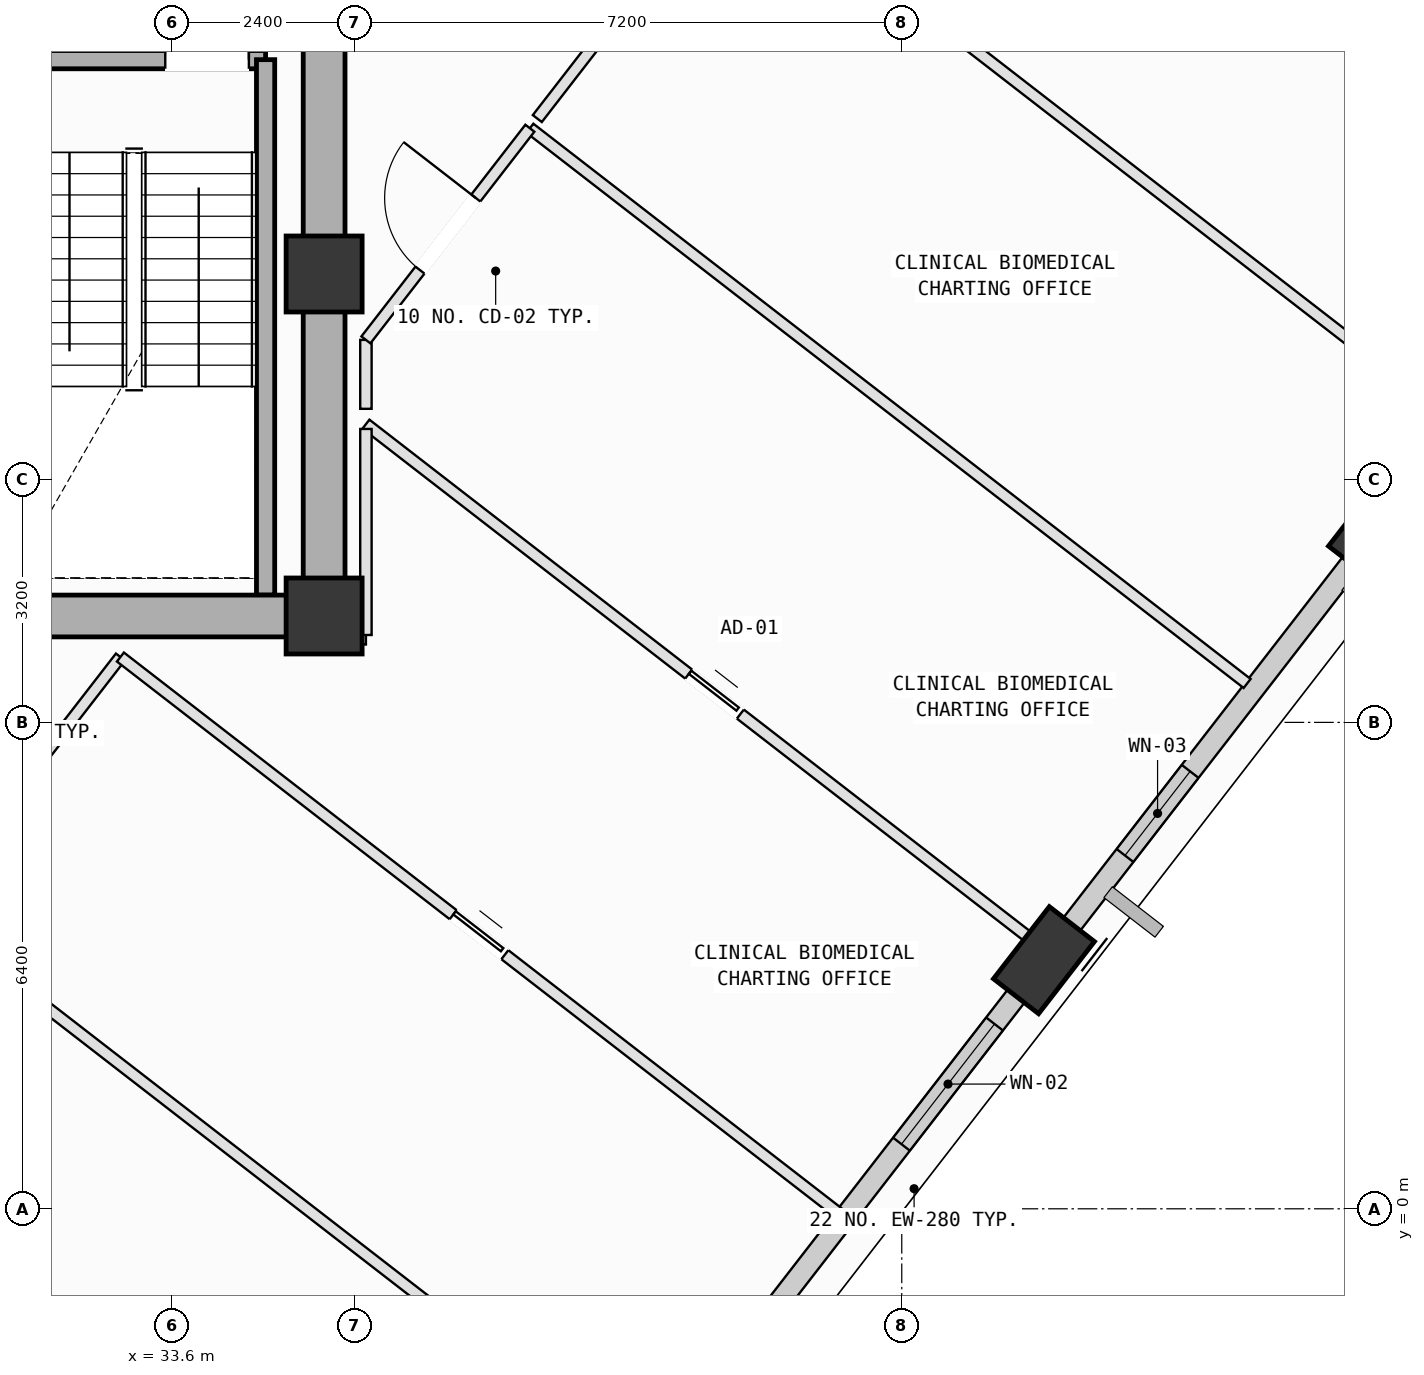
"""IFC4 building model, lengths in metres.
Left out: names, types, materials, properties, quantities, classifications, styles, units other than length and angle.
Written with IfcOpenShell. Run it as: python <this file> out.ifc"""

import sys

from ifc_helpers import new_model, si_unit, direction, frame, frame_2d, origin, origin_2d, place, context, subcontext, project, spatial, rectangle, extrude, element, fill, save


model = new_model("IFC4")
c1 = context("Model", 3, precision=1e-05, world=origin(), true_north=direction((0.0, 1.0)))
c2 = subcontext(c1, "Body", "Model", "MODEL_VIEW")
j1 = project(units=[si_unit("LENGTHUNIT", "METRE"), si_unit("PLANEANGLEUNIT", "RADIAN")], contexts=[c1])
p1 = place(None, origin())
s1 = spatial("IfcSite", under=j1, at=p1, CompositionType="ELEMENT")
p2 = place(p1, origin())
s2 = spatial("IfcBuilding", under=s1, at=p2, CompositionType="ELEMENT")
p3 = place(p2, frame((0.0, 0.0, 247.2)))
s3 = spatial("IfcBuildingStorey", under=s2, at=p3, CompositionType="ELEMENT", Elevation=247.2)
for number, where, z_axis, x_axis in (
    (1, (35.6, 7.8, 0.0), (0.0, 0.0, 1.0), (1.0, 0.0, 0.0)),
    (2, (35.6, 12.3, 0.0), (0.0, 0.0, 1.0), (1.0, 0.0, 0.0)),
):
    element("IfcColumn", number, at=place(p3, frame(where, z_axis=z_axis, x_axis=x_axis)), inside=s3, PredefinedType="COLUMN", context=c2, shape_type="SweptSolid", body=[
        extrude(rectangle(XDim=1.0, YDim=1.0, at=origin_2d()), origin(), (0.0, 0.0, 1.0), 4.0),
    ])
p4 = place(p3, frame((45.071, 3.271, 0.002), z_axis=(0.088375757115, 0.048077870617, 0.994926250489), x_axis=(-0.98360363515, 0.161851376918, 0.079548857375)))
e3 = element("IfcColumn", 3, at=p4, inside=s3, PredefinedType="COLUMN", context=c2, shape_type="SweptSolid", body=[
    extrude(rectangle(XDim=1.2, YDim=0.75, at=origin_2d()), origin(), (0.0, 0.0, 1.0), 4.017),
])
p5 = place(p3, frame((49.479, 8.964, 0.002), z_axis=(0.064782917664, 0.066060327308, 0.995710403046), x_axis=(-0.988350873328, -0.133455718622, 0.073158200899)))
e4 = element("IfcColumn", 4, at=p5, inside=s3, PredefinedType="COLUMN", context=c2, shape_type="SweptSolid", body=[
    extrude(rectangle(XDim=1.2, YDim=0.75, at=origin_2d()), origin(), (0.0, 0.0, 1.0), 4.014),
])
p6 = place(p3, frame((44.946, 3.11, 0.0), z_axis=(0.0, 0.0, 1.0), x_axis=(-0.612214489322, -0.790691734537, 0.0)))
e5 = element("IfcWall", 5, at=p6, inside=s3, PredefinedType="SOLIDWALL", context=c2, shape_type="SweptSolid", body=[
    extrude(rectangle(XDim=6.439, YDim=0.28, at=frame_2d((3.219, 0.0))), origin(), (0.0, 0.0, 1.0), 3.265),
])
p7 = place(p6, frame((0.858, 0.0, 0.75)))
e6 = element("IfcOpeningElement", 6, at=p7, cuts=e5, PredefinedType="OPENING", context=c2, shape_type="SweptSolid", body=[
    extrude(rectangle(XDim=2.0, YDim=1.95, at=frame_2d((1.0, 0.975))), frame((0.0, 0.15, 0.0), z_axis=(0.0, -1.0, 0.0), x_axis=(1.0, 0.0, 0.0)), (0.0, 0.0, 1.0), 0.3),
])
p8 = place(p3, frame((49.349, 8.796, 0.0), z_axis=(0.0, 0.0, 1.0), x_axis=(-0.612226167932, -0.790682691918, 0.0)))
e7 = element("IfcWall", 7, at=p8, inside=s3, PredefinedType="SOLIDWALL", context=c2, shape_type="SweptSolid", body=[
    extrude(rectangle(XDim=6.414, YDim=0.28, at=frame_2d((3.207, 0.0))), origin(), (0.0, 0.0, 1.0), 3.265),
])
p9 = place(p8, frame((3.846, 0.0, 0.75)))
e8 = element("IfcOpeningElement", 8, at=p9, cuts=e7, PredefinedType="OPENING", context=c2, shape_type="SweptSolid", body=[
    extrude(rectangle(XDim=1.4, YDim=1.85, at=frame_2d((0.7, 0.925))), frame((0.0, 0.15, 0.0), z_axis=(0.0, -1.0, 0.0), x_axis=(1.0, 0.0, 0.0)), (0.0, 0.0, 1.0), 0.3),
])
p10 = place(p3, frame((31.37, 15.12, 0.0), z_axis=(0.0, 0.0, 1.0), x_axis=(1.0, 0.0, 0.0)))
e9 = element("IfcWall", 9, at=p10, inside=s3, PredefinedType="SOLIDWALL", context=c2, shape_type="SweptSolid", body=[
    extrude(rectangle(XDim=3.46, YDim=0.24, at=frame_2d((1.73, 0.0))), origin(), (0.0, 0.0, 1.0), 3.78),
])
p11 = place(p10, frame((2.14, 0.0, 0.0)))
e10 = element("IfcOpeningElement", 10, at=p11, cuts=e9, PredefinedType="OPENING", context=c2, shape_type="SweptSolid", body=[
    extrude(rectangle(XDim=1.1, YDim=2.15, at=frame_2d((0.55, 1.075))), frame((0.0, 0.13, 0.0), z_axis=(0.0, -1.0, 0.0), x_axis=(1.0, 0.0, 0.0)), (0.0, 0.0, 1.0), 0.26),
])
p12 = place(p3, frame((34.83, 15.12, 0.0), z_axis=(0.0, 0.0, 1.0), x_axis=(0.0, -1.0, 0.0)))
e11 = element("IfcWall", 11, at=p12, inside=s3, PredefinedType="SOLIDWALL", context=c2, shape_type="SweptSolid", body=[
    extrude(rectangle(XDim=7.045, YDim=0.24, at=frame_2d((3.522, 0.0))), origin(), (0.0, 0.0, 1.0), 3.78),
])
p13 = place(p3, frame((24.8, 7.8, 0.0), z_axis=(0.0, 0.0, 1.0), x_axis=(1.0, 0.0, 0.0)))
e12 = element("IfcWall", 12, at=p13, inside=s3, PredefinedType="SHEAR", context=c2, shape_type="SweptSolid", body=[
    extrude(rectangle(XDim=10.8, YDim=0.55, at=frame_2d((5.4, 0.0))), origin(), (0.0, 0.0, 1.0), 3.78),
])
p14 = place(p3, frame((35.6, 7.8, 0.0), z_axis=(0.0, 0.0, 1.0), x_axis=(0.0, 1.0, 0.0)))
e13 = element("IfcWall", 13, at=p14, inside=s3, PredefinedType="SHEAR", context=c2, shape_type="SweptSolid", body=[
    extrude(rectangle(XDim=9.0, YDim=0.55, at=frame_2d((4.5, 0.0))), origin(), (0.0, 0.0, 1.0), 3.78),
])
p15 = place(p3, frame((30.324, 3.908, 0.0), z_axis=(0.0, 0.0, 1.0), x_axis=(0.612292812762, 0.790631084287, 0.0)))
e14 = element("IfcWall", 14, at=p15, inside=s3, PredefinedType="PARTITIONING", context=c2, shape_type="SweptSolid", body=[
    extrude(rectangle(XDim=4.24, YDim=0.15, at=frame_2d((2.12, 0.0))), origin(), (0.0, 0.0, 1.0), 3.78),
])
p16 = place(p3, frame((32.92, 7.26, 0.0), z_axis=(0.0, 0.0, 1.0), x_axis=(0.790650233598, -0.612268085164, 0.0)))
e15 = element("IfcWall", 15, at=p16, inside=s3, PredefinedType="PARTITIONING", context=c2, shape_type="SweptSolid", body=[
    extrude(rectangle(XDim=11.935, YDim=0.15, at=frame_2d((5.967, 0.0))), origin(), (0.0, 0.0, 1.0), 3.78),
])
p17 = place(p16, frame((5.537, 0.0, 0.0)))
e16 = element("IfcOpeningElement", 16, at=p17, cuts=e15, PredefinedType="OPENING", context=c2, shape_type="SweptSolid", body=[
    extrude(rectangle(XDim=0.86, YDim=2.06, at=frame_2d((0.43, 1.03))), frame((0.0, 0.085, 0.0), z_axis=(0.0, -1.0, 0.0), x_axis=(1.0, 0.0, 0.0)), (0.0, 0.0, 1.0), 0.17),
])
p18 = place(p3, frame((39.761, -3.399, 0.0), z_axis=(0.0, 0.0, 1.0), x_axis=(-0.790690807158, 0.612215687055, 0.0)))
e17 = element("IfcWall", 17, at=p18, inside=s3, PredefinedType="PARTITIONING", context=c2, shape_type="SweptSolid", body=[
    extrude(rectangle(XDim=11.935, YDim=0.15, at=frame_2d((5.968, 0.0))), origin(), (0.0, 0.0, 1.0), 3.78),
])
p19 = place(p3, frame((36.15, 10.324, 0.0), z_axis=(0.0, 0.0, 1.0), x_axis=(0.790670472716, -0.612241948559, 0.0)))
e18 = element("IfcWall", 18, at=p19, inside=s3, PredefinedType="PARTITIONING", context=c2, shape_type="SweptSolid", body=[
    extrude(rectangle(XDim=11.602, YDim=0.15, at=frame_2d((5.801, 0.0))), origin(), (0.0, 0.0, 1.0), 3.165),
])
p20 = place(p19, frame((5.371, 0.0, 0.0)))
e19 = element("IfcOpeningElement", 19, at=p20, cuts=e18, PredefinedType="OPENING", context=c2, shape_type="SweptSolid", body=[
    extrude(rectangle(XDim=0.86, YDim=2.06, at=frame_2d((0.43, 1.03))), frame((0.0, 0.085, 0.0), z_axis=(0.0, -1.0, 0.0), x_axis=(1.0, 0.0, 0.0)), (0.0, 0.0, 1.0), 0.17),
])
p21 = place(p3, frame((35.6, 7.5, 0.0), z_axis=(0.0, 0.0, 1.0), x_axis=(1.0, 0.0, 0.0)))
e20 = element("IfcWall", 20, at=p21, inside=s3, PredefinedType="PARTITIONING", context=c2, shape_type="SweptSolid", body=[
    extrude(rectangle(XDim=0.55, YDim=0.15, at=frame_2d((0.275, 0.0))), origin(), (0.0, 0.0, 1.0), 3.78),
])
p22 = place(p3, frame((36.15, 7.55, 0.0), z_axis=(0.0, 0.0, 1.0), x_axis=(0.0, 1.0, 0.0)))
e21 = element("IfcWall", 21, at=p22, inside=s3, PredefinedType="PARTITIONING", context=c2, shape_type="SweptSolid", body=[
    extrude(rectangle(XDim=2.711, YDim=0.15, at=frame_2d((1.355, 0.0))), origin(), (0.0, 0.0, 1.0), 3.78),
])
p23 = place(p3, frame((38.307, 14.218, 0.0), z_axis=(0.0, 0.0, 1.0), x_axis=(0.79073041553, -0.612164528502, 0.0)))
e22 = element("IfcWall", 22, at=p23, inside=s3, PredefinedType="PARTITIONING", context=c2, shape_type="SweptSolid", body=[
    extrude(rectangle(XDim=11.935, YDim=0.15, at=frame_2d((5.967, 0.0))), origin(), (0.0, 0.0, 1.0), 3.78),
])
p24 = place(p3, frame((36.15, 10.526, 0.0), z_axis=(0.0, 0.0, 1.0), x_axis=(0.0, 1.0, 0.0)))
e23 = element("IfcWall", 23, at=p24, inside=s3, PredefinedType="PARTITIONING", context=c2, shape_type="SweptSolid", body=[
    extrude(rectangle(XDim=0.907, YDim=0.15, at=frame_2d((0.454, 0.0))), origin(), (0.0, 0.0, 1.0), 3.78),
])
p25 = place(p3, frame((36.15, 11.433, 0.0), z_axis=(0.0, 0.0, 1.0), x_axis=(0.612336732494, 0.790597069333, 0.0)))
e24 = element("IfcWall", 24, at=p25, inside=s3, PredefinedType="PARTITIONING", context=c2, shape_type="SweptSolid", body=[
    extrude(rectangle(XDim=3.522, YDim=0.15, at=frame_2d((1.761, 0.0))), origin(), (0.0, 0.0, 1.0), 3.78),
])
p26 = place(p25, frame((1.161, 0.0, 0.0)))
e25 = element("IfcOpeningElement", 25, at=p26, cuts=e24, PredefinedType="OPENING", context=c2, shape_type="SweptSolid", body=[
    extrude(rectangle(XDim=1.2, YDim=2.15, at=frame_2d((0.6, 1.075))), frame((0.0, 0.085, 0.0), z_axis=(0.0, -1.0, 0.0), x_axis=(1.0, 0.0, 0.0)), (0.0, 0.0, 1.0), 0.17),
])
p27 = place(p3, frame((38.405, 14.345, 0.0), z_axis=(0.0, 0.0, 1.0), x_axis=(0.612292812762, 0.790631084287, 0.0)))
e26 = element("IfcWall", 26, at=p27, inside=s3, PredefinedType="PARTITIONING", context=c2, shape_type="SweptSolid", body=[
    extrude(rectangle(XDim=4.24, YDim=0.15, at=frame_2d((2.12, 0.0))), origin(), (0.0, 0.0, 1.0), 3.78),
])
p28 = place(p27, frame((1.52, 0.0, 0.0)))
e27 = element("IfcOpeningElement", 27, at=p28, cuts=e26, PredefinedType="OPENING", context=c2, shape_type="SweptSolid", body=[
    extrude(rectangle(XDim=1.2, YDim=2.15, at=frame_2d((0.6, 1.075))), frame((0.0, 0.085, 0.0), z_axis=(0.0, -1.0, 0.0), x_axis=(1.0, 0.0, 0.0)), (0.0, 0.0, 1.0), 0.17),
])
p29 = place(p3, frame((41.001, 17.697, 0.0), z_axis=(0.0, 0.0, 1.0), x_axis=(0.790650233598, -0.612268085164, 0.0)))
e28 = element("IfcWall", 28, at=p29, inside=s3, PredefinedType="PARTITIONING", context=c2, shape_type="SweptSolid", body=[
    extrude(rectangle(XDim=11.935, YDim=0.15, at=frame_2d((5.967, 0.0))), origin(), (0.0, 0.0, 1.0), 3.78),
])
p30 = place(p3, frame((43.756, 21.256, 0.0), z_axis=(0.0, 0.0, 1.0), x_axis=(0.790680905168, -0.612228475492, 0.0)))
e29 = element("IfcWall", 29, at=p30, inside=s3, PredefinedType="PARTITIONING", context=c2, shape_type="SweptSolid", body=[
    extrude(rectangle(XDim=11.935, YDim=0.15, at=frame_2d((5.968, 0.0))), origin(), (0.0, 0.0, 1.0), 3.78),
])
p31 = place(p7, origin())
e30 = element("IfcWindow", 30, at=p31, inside=s3, PartitioningType="SINGLE_PANEL", PredefinedType="WINDOW", context=c2, shape_type="SweptSolid", body=[
    extrude(rectangle(XDim=2.0, YDim=1.95, at=frame_2d((1.0, 0.975))), frame((0.0, 0.03, 0.0), z_axis=(0.0, -1.0, 0.0), x_axis=(1.0, 0.0, 0.0)), (0.0, 0.0, 1.0), 0.06),
])
fill(e6, e30)
p32 = place(p9, origin())
e31 = element("IfcWindow", 31, at=p32, inside=s3, PartitioningType="SINGLE_PANEL", PredefinedType="WINDOW", context=c2, shape_type="SweptSolid", body=[
    extrude(rectangle(XDim=1.4, YDim=1.85, at=frame_2d((0.7, 0.925))), frame((0.0, 0.03, 0.0), z_axis=(0.0, -1.0, 0.0), x_axis=(1.0, 0.0, 0.0)), (0.0, 0.0, 1.0), 0.06),
])
fill(e8, e31)
p33 = place(p11, origin())
e32 = element("IfcDoor", 32, at=p33, inside=s3, OperationType="SINGLE_SWING_RIGHT", PredefinedType="DOOR", context=c2, shape_type="SweptSolid", body=[
    extrude(rectangle(XDim=1.1, YDim=2.15, at=frame_2d((0.55, 1.075))), frame((0.0, 0.025, 0.0), z_axis=(0.0, -1.0, 0.0), x_axis=(1.0, 0.0, 0.0)), (0.0, 0.0, 1.0), 0.05),
])
fill(e10, e32)
p34 = place(p26, origin())
e33 = element("IfcDoor", 33, at=p34, inside=s3, OperationType="SINGLE_SWING_RIGHT", PredefinedType="DOOR", context=c2, shape_type="SweptSolid", body=[
    extrude(rectangle(XDim=1.2, YDim=2.15, at=frame_2d((0.6, 1.075))), frame((0.0, 0.025, 0.0), z_axis=(0.0, -1.0, 0.0), x_axis=(1.0, 0.0, 0.0)), (0.0, 0.0, 1.0), 0.05),
])
fill(e25, e33)
p35 = place(p20, origin())
e34 = element("IfcDoor", 34, at=p35, inside=s3, OperationType="SLIDING_TO_LEFT", PredefinedType="DOOR", context=c2, shape_type="SweptSolid", body=[
    extrude(rectangle(XDim=0.86, YDim=2.06, at=frame_2d((0.43, 1.03))), frame((0.0, 0.025, 0.0), z_axis=(0.0, -1.0, 0.0), x_axis=(1.0, 0.0, 0.0)), (0.0, 0.0, 1.0), 0.05),
])
fill(e19, e34)
p36 = place(p17, origin())
e35 = element("IfcDoor", 35, at=p36, inside=s3, OperationType="SLIDING_TO_LEFT", PredefinedType="DOOR", context=c2, shape_type="SweptSolid", body=[
    extrude(rectangle(XDim=0.86, YDim=2.06, at=frame_2d((0.43, 1.03))), frame((0.0, 0.025, 0.0), z_axis=(0.0, -1.0, 0.0), x_axis=(1.0, 0.0, 0.0)), (0.0, 0.0, 1.0), 0.05),
])
fill(e16, e35)
save(model, sys.argv[1])
